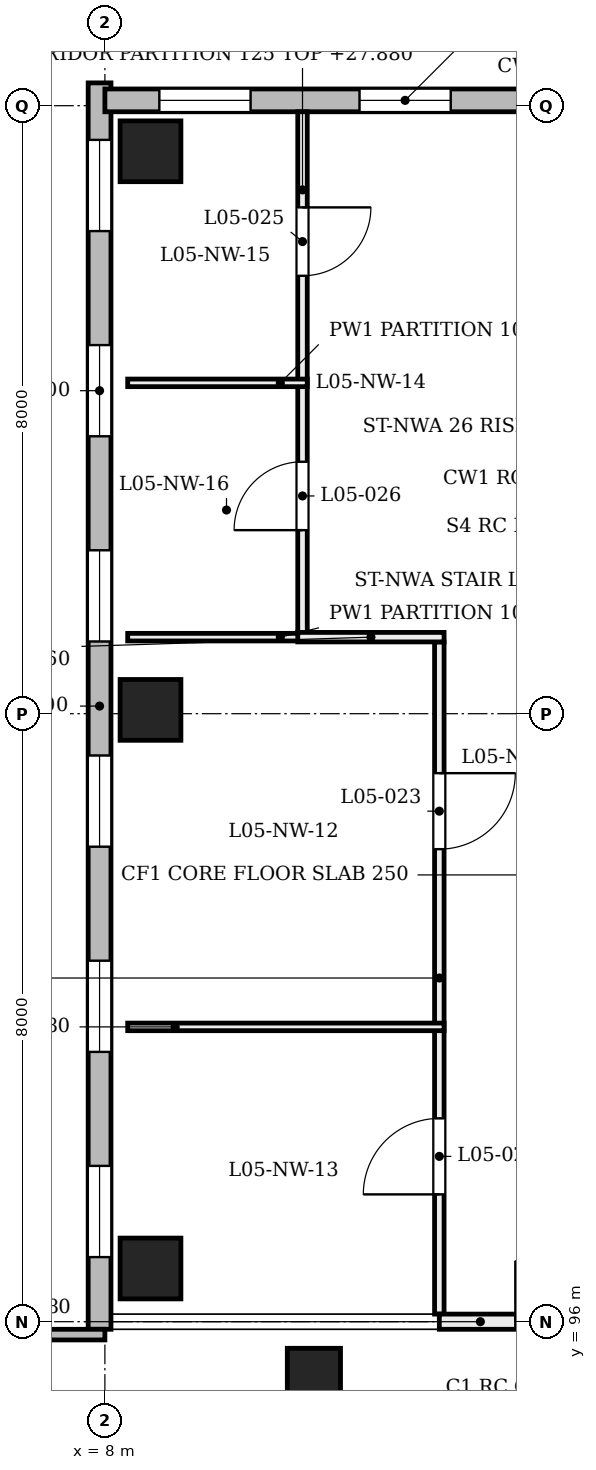
"""IFC4 building model, lengths in metres.
Left out: names, types, materials, properties, quantities, classifications, styles, units other than length and angle.
Written with IfcOpenShell. Run it as: python <this file> out.ifc"""

import sys

from ifc_helpers import new_model, si_unit, direction, frame, frame_2d, origin, origin_2d, place, context, subcontext, project, spatial, rectangle, extrude, element, fill, save


model = new_model("IFC4")
c1 = context("Model", 3, precision=1e-05, world=origin(), true_north=direction((0.0, 1.0)))
c2 = subcontext(c1, "Body", "Model", "MODEL_VIEW")
j1 = project(units=[si_unit("LENGTHUNIT", "METRE"), si_unit("PLANEANGLEUNIT", "RADIAN")], contexts=[c1])
p1 = place(None, origin())
s1 = spatial("IfcSite", under=j1, at=p1, CompositionType="ELEMENT")
p2 = place(p1, origin())
s2 = spatial("IfcBuilding", under=s1, at=p2, CompositionType="ELEMENT")
p3 = place(p2, frame((0.0, 0.0, 24.0)))
s3 = spatial("IfcBuildingStorey", under=s2, at=p3, CompositionType="ELEMENT", Elevation=24.0)
for number, where, z_axis, x_axis in (
    (1, (8.6, 96.7, 0.0), (0.0, 0.0, 1.0), (1.0, 0.0, 0.0)),
    (2, (8.6, 104.05, 0.0), (0.0, 0.0, 1.0), (1.0, 0.0, 0.0)),
    (3, (8.6, 111.4, 0.0), (0.0, 0.0, 1.0), (1.0, 0.0, 0.0)),
):
    element("IfcColumn", number, at=place(p3, frame(where, z_axis=z_axis, x_axis=x_axis)), inside=s3, PredefinedType="COLUMN", context=c2, shape_type="SweptSolid", body=[
        extrude(rectangle(XDim=0.8, YDim=0.8, at=origin_2d()), origin(), (0.0, 0.0, 1.0), 4.58),
    ])
p4 = place(p3, frame((11.0, 95.3, 0.0), z_axis=(-0.203937582782, 0.0, 0.978983892783), x_axis=(0.0, -1.0, 0.0)))
e4 = element("IfcColumn", 4, at=p4, inside=s3, PredefinedType="COLUMN", context=c2, shape_type="SweptSolid", body=[
    extrude(rectangle(XDim=0.7, YDim=0.7, at=origin_2d()), origin(), (0.0, 0.0, 1.0), 4.678),
])
p5 = place(p3, frame((7.93, 95.9, 0.0), z_axis=(0.0, 0.0, 1.0), x_axis=(0.0, 1.0, 0.0)))
e5 = element("IfcWall", 5, at=p5, inside=s3, PredefinedType="SOLIDWALL", context=c2, shape_type="SweptSolid", body=[
    extrude(rectangle(XDim=16.4, YDim=0.3, at=frame_2d((8.2, 0.0))), origin(), (0.0, 0.0, 1.0), 3.9),
])
p6 = place(p5, frame((0.95, 0.0, 1.0)))
e6 = element("IfcOpeningElement", 6, at=p6, cuts=e5, PredefinedType="OPENING", context=c2, shape_type="SweptSolid", body=[
    extrude(rectangle(XDim=1.2, YDim=2.4, at=frame_2d((0.6, 1.2))), frame((0.0, 0.16, 0.0), z_axis=(0.0, -1.0, 0.0), x_axis=(1.0, 0.0, 0.0)), (0.0, 0.0, 1.0), 0.32),
])
p7 = place(p5, frame((3.65, 0.0, 1.0)))
e7 = element("IfcOpeningElement", 7, at=p7, cuts=e5, PredefinedType="OPENING", context=c2, shape_type="SweptSolid", body=[
    extrude(rectangle(XDim=1.2, YDim=2.4, at=frame_2d((0.6, 1.2))), frame((0.0, 0.16, 0.0), z_axis=(0.0, -1.0, 0.0), x_axis=(1.0, 0.0, 0.0)), (0.0, 0.0, 1.0), 0.32),
])
p8 = place(p5, frame((6.35, 0.0, 1.0)))
e8 = element("IfcOpeningElement", 8, at=p8, cuts=e5, PredefinedType="OPENING", context=c2, shape_type="SweptSolid", body=[
    extrude(rectangle(XDim=1.2, YDim=2.4, at=frame_2d((0.6, 1.2))), frame((0.0, 0.16, 0.0), z_axis=(0.0, -1.0, 0.0), x_axis=(1.0, 0.0, 0.0)), (0.0, 0.0, 1.0), 0.32),
])
p9 = place(p5, frame((9.05, 0.0, 1.0)))
e9 = element("IfcOpeningElement", 9, at=p9, cuts=e5, PredefinedType="OPENING", context=c2, shape_type="SweptSolid", body=[
    extrude(rectangle(XDim=1.2, YDim=2.4, at=frame_2d((0.6, 1.2))), frame((0.0, 0.16, 0.0), z_axis=(0.0, -1.0, 0.0), x_axis=(1.0, 0.0, 0.0)), (0.0, 0.0, 1.0), 0.32),
])
p10 = place(p5, frame((11.75, 0.0, 1.0)))
e10 = element("IfcOpeningElement", 10, at=p10, cuts=e5, PredefinedType="OPENING", context=c2, shape_type="SweptSolid", body=[
    extrude(rectangle(XDim=1.2, YDim=2.4, at=frame_2d((0.6, 1.2))), frame((0.0, 0.16, 0.0), z_axis=(0.0, -1.0, 0.0), x_axis=(1.0, 0.0, 0.0)), (0.0, 0.0, 1.0), 0.32),
])
p11 = place(p5, frame((14.45, 0.0, 1.0)))
e11 = element("IfcOpeningElement", 11, at=p11, cuts=e5, PredefinedType="OPENING", context=c2, shape_type="SweptSolid", body=[
    extrude(rectangle(XDim=1.2, YDim=2.4, at=frame_2d((0.6, 1.2))), frame((0.0, 0.16, 0.0), z_axis=(0.0, -1.0, 0.0), x_axis=(1.0, 0.0, 0.0)), (0.0, 0.0, 1.0), 0.32),
])
p12 = place(p3, frame((8.0, 112.07, 0.0), z_axis=(0.0, 0.0, 1.0), x_axis=(1.0, 0.0, 0.0)))
e12 = element("IfcWall", 12, at=p12, inside=s3, PredefinedType="SOLIDWALL", context=c2, shape_type="SweptSolid", body=[
    extrude(rectangle(XDim=7.9, YDim=0.3, at=frame_2d((3.95, 0.0))), origin(), (0.0, 0.0, 1.0), 3.9),
])
p13 = place(p12, frame((0.717, 0.0, 1.0)))
e13 = element("IfcOpeningElement", 13, at=p13, cuts=e12, PredefinedType="OPENING", context=c2, shape_type="SweptSolid", body=[
    extrude(rectangle(XDim=1.2, YDim=2.4, at=frame_2d((0.6, 1.2))), frame((0.0, 0.16, 0.0), z_axis=(0.0, -1.0, 0.0), x_axis=(1.0, 0.0, 0.0)), (0.0, 0.0, 1.0), 0.32),
])
p14 = place(p12, frame((3.35, 0.0, 1.0)))
e14 = element("IfcOpeningElement", 14, at=p14, cuts=e12, PredefinedType="OPENING", context=c2, shape_type="SweptSolid", body=[
    extrude(rectangle(XDim=1.2, YDim=2.4, at=frame_2d((0.6, 1.2))), frame((0.0, 0.16, 0.0), z_axis=(0.0, -1.0, 0.0), x_axis=(1.0, 0.0, 0.0)), (0.0, 0.0, 1.0), 0.32),
])
p15 = place(p12, frame((5.983, 0.0, 1.0)))
e15 = element("IfcOpeningElement", 15, at=p15, cuts=e12, PredefinedType="OPENING", context=c2, shape_type="SweptSolid", body=[
    extrude(rectangle(XDim=1.2, YDim=2.4, at=frame_2d((0.6, 1.2))), frame((0.0, 0.16, 0.0), z_axis=(0.0, -1.0, 0.0), x_axis=(1.0, 0.0, 0.0)), (0.0, 0.0, 1.0), 0.32),
])
p16 = place(p3, frame((3.0, 95.83, 0.0), z_axis=(0.0, 0.0, 1.0), x_axis=(1.0, 0.0, 0.0)))
e16 = element("IfcWall", 16, at=p16, inside=s3, PredefinedType="SOLIDWALL", context=c2, shape_type="SweptSolid", body=[
    extrude(rectangle(XDim=5.0, YDim=0.14, at=frame_2d((2.5, 0.0))), origin(), (0.0, 0.0, 1.0), 3.9),
])
p17 = place(p3, frame((12.4, 96.1, 0.0), z_axis=(0.0, 0.0, 1.0), x_axis=(0.0, 1.0, 0.0)))
e17 = element("IfcWall", 17, at=p17, inside=s3, PredefinedType="PARTITIONING", context=c2, shape_type="SweptSolid", body=[
    extrude(rectangle(XDim=8.844, YDim=0.125, at=frame_2d((4.422, 0.0))), origin(), (0.0, 0.0, 1.0), 3.88),
])
p18 = place(p17, frame((6.117, 0.0, 0.0)))
e18 = element("IfcOpeningElement", 18, at=p18, cuts=e17, PredefinedType="OPENING", context=c2, shape_type="SweptSolid", body=[
    extrude(rectangle(XDim=1.0, YDim=2.1, at=frame_2d((0.5, 1.05))), frame((0.0, 0.073, 0.0), z_axis=(0.0, -1.0, 0.0), x_axis=(1.0, 0.0, 0.0)), (0.0, 0.0, 1.0), 0.145),
])
p19 = place(p17, frame((1.575, 0.0, 0.0)))
e19 = element("IfcOpeningElement", 19, at=p19, cuts=e17, PredefinedType="OPENING", context=c2, shape_type="SweptSolid", body=[
    extrude(rectangle(XDim=1.0, YDim=2.1, at=frame_2d((0.5, 1.05))), frame((0.0, 0.073, 0.0), z_axis=(0.0, -1.0, 0.0), x_axis=(1.0, 0.0, 0.0)), (0.0, 0.0, 1.0), 0.145),
])
p20 = place(p3, frame((10.6, 105.069, 0.0), z_axis=(0.0, 0.0, 1.0), x_axis=(0.0, 1.0, 0.0)))
e20 = element("IfcWall", 20, at=p20, inside=s3, PredefinedType="PARTITIONING", context=c2, shape_type="SweptSolid", body=[
    extrude(rectangle(XDim=6.851, YDim=0.125, at=frame_2d((3.425, 0.0))), origin(), (0.0, 0.0, 1.0), 3.88),
])
p21 = place(p20, frame((4.693, 0.0, 0.0)))
e21 = element("IfcOpeningElement", 21, at=p21, cuts=e20, PredefinedType="OPENING", context=c2, shape_type="SweptSolid", body=[
    extrude(rectangle(XDim=0.9, YDim=2.1, at=frame_2d((0.45, 1.05))), frame((0.0, 0.073, 0.0), z_axis=(0.0, -1.0, 0.0), x_axis=(1.0, 0.0, 0.0)), (0.0, 0.0, 1.0), 0.145),
])
p22 = place(p20, frame((1.346, 0.0, 0.0)))
e22 = element("IfcOpeningElement", 22, at=p22, cuts=e20, PredefinedType="OPENING", context=c2, shape_type="SweptSolid", body=[
    extrude(rectangle(XDim=0.9, YDim=2.1, at=frame_2d((0.45, 1.05))), frame((0.0, 0.073, 0.0), z_axis=(0.0, -1.0, 0.0), x_axis=(1.0, 0.0, 0.0)), (0.0, 0.0, 1.0), 0.145),
])
p23 = place(p3, frame((8.3, 99.879, 0.0), z_axis=(0.0, 0.0, 1.0), x_axis=(1.0, 0.0, 0.0)))
e23 = element("IfcWall", 23, at=p23, inside=s3, PredefinedType="PARTITIONING", context=c2, shape_type="SweptSolid", body=[
    extrude(rectangle(XDim=4.162, YDim=0.1, at=frame_2d((2.081, 0.0))), origin(), (0.0, 0.0, 1.0), 3.98),
])
p24 = place(p3, frame((8.3, 105.007, 0.0), z_axis=(0.0, 0.0, 1.0), x_axis=(1.0, 0.0, 0.0)))
e24 = element("IfcWall", 24, at=p24, inside=s3, PredefinedType="PARTITIONING", context=c2, shape_type="SweptSolid", body=[
    extrude(rectangle(XDim=2.363, YDim=0.1, at=frame_2d((1.181, 0.0))), origin(), (0.0, 0.0, 1.0), 3.98),
])
p25 = place(p3, frame((10.538, 105.007, 0.0), z_axis=(0.0, 0.0, 1.0), x_axis=(1.0, 0.0, 0.0)))
e25 = element("IfcWall", 25, at=p25, inside=s3, PredefinedType="PARTITIONING", context=c2, shape_type="SweptSolid", body=[
    extrude(rectangle(XDim=1.925, YDim=0.125, at=frame_2d((0.962, 0.0))), origin(), (0.0, 0.0, 1.0), 4.56),
])
p26 = place(p3, frame((8.3, 108.353, 0.0), z_axis=(0.0, 0.0, 1.0), x_axis=(1.0, 0.0, 0.0)))
e26 = element("IfcWall", 26, at=p26, inside=s3, PredefinedType="PARTITIONING", context=c2, shape_type="SweptSolid", body=[
    extrude(rectangle(XDim=2.363, YDim=0.1, at=frame_2d((1.181, 0.0))), origin(), (0.0, 0.0, 1.0), 3.98),
])
p27 = place(p3, frame((12.4, 96.0, 0.0), z_axis=(0.0, 0.0, 1.0), x_axis=(1.0, 0.0, 0.0)))
e27 = element("IfcWall", 27, at=p27, inside=s3, PredefinedType="PARTITIONING", context=c2, shape_type="SweptSolid", body=[
    extrude(rectangle(XDim=3.6, YDim=0.2, at=frame_2d((1.8, 0.0))), origin(), (0.0, 0.0, 1.0), 3.88),
])
p28 = place(p27, frame((1.0, 0.0, 0.0)))
e28 = element("IfcOpeningElement", 28, at=p28, cuts=e27, PredefinedType="OPENING", context=c2, shape_type="SweptSolid", body=[
    extrude(rectangle(XDim=1.6, YDim=2.1, at=frame_2d((0.8, 1.05))), frame((0.0, 0.11, 0.0), z_axis=(0.0, -1.0, 0.0), x_axis=(1.0, 0.0, 0.0)), (0.0, 0.0, 1.0), 0.22),
])
p29 = place(p6, origin())
e29 = element("IfcWindow", 29, at=p29, inside=s3, PartitioningType="SINGLE_PANEL", PredefinedType="WINDOW", context=c2, shape_type="SweptSolid", body=[
    extrude(rectangle(XDim=1.2, YDim=2.4, at=frame_2d((0.6, 1.2))), frame((0.0, 0.03, 0.0), z_axis=(0.0, -1.0, 0.0), x_axis=(1.0, 0.0, 0.0)), (0.0, 0.0, 1.0), 0.06),
])
fill(e6, e29)
p30 = place(p7, origin())
e30 = element("IfcWindow", 30, at=p30, inside=s3, PartitioningType="SINGLE_PANEL", PredefinedType="WINDOW", context=c2, shape_type="SweptSolid", body=[
    extrude(rectangle(XDim=1.2, YDim=2.4, at=frame_2d((0.6, 1.2))), frame((0.0, 0.03, 0.0), z_axis=(0.0, -1.0, 0.0), x_axis=(1.0, 0.0, 0.0)), (0.0, 0.0, 1.0), 0.06),
])
fill(e7, e30)
p31 = place(p8, origin())
e31 = element("IfcWindow", 31, at=p31, inside=s3, PartitioningType="SINGLE_PANEL", PredefinedType="WINDOW", context=c2, shape_type="SweptSolid", body=[
    extrude(rectangle(XDim=1.2, YDim=2.4, at=frame_2d((0.6, 1.2))), frame((0.0, 0.03, 0.0), z_axis=(0.0, -1.0, 0.0), x_axis=(1.0, 0.0, 0.0)), (0.0, 0.0, 1.0), 0.06),
])
fill(e8, e31)
p32 = place(p9, origin())
e32 = element("IfcWindow", 32, at=p32, inside=s3, PartitioningType="SINGLE_PANEL", PredefinedType="WINDOW", context=c2, shape_type="SweptSolid", body=[
    extrude(rectangle(XDim=1.2, YDim=2.4, at=frame_2d((0.6, 1.2))), frame((0.0, 0.03, 0.0), z_axis=(0.0, -1.0, 0.0), x_axis=(1.0, 0.0, 0.0)), (0.0, 0.0, 1.0), 0.06),
])
fill(e9, e32)
p33 = place(p10, origin())
e33 = element("IfcWindow", 33, at=p33, inside=s3, PartitioningType="SINGLE_PANEL", PredefinedType="WINDOW", context=c2, shape_type="SweptSolid", body=[
    extrude(rectangle(XDim=1.2, YDim=2.4, at=frame_2d((0.6, 1.2))), frame((0.0, 0.03, 0.0), z_axis=(0.0, -1.0, 0.0), x_axis=(1.0, 0.0, 0.0)), (0.0, 0.0, 1.0), 0.06),
])
fill(e10, e33)
p34 = place(p11, origin())
e34 = element("IfcWindow", 34, at=p34, inside=s3, PartitioningType="SINGLE_PANEL", PredefinedType="WINDOW", context=c2, shape_type="SweptSolid", body=[
    extrude(rectangle(XDim=1.2, YDim=2.4, at=frame_2d((0.6, 1.2))), frame((0.0, 0.03, 0.0), z_axis=(0.0, -1.0, 0.0), x_axis=(1.0, 0.0, 0.0)), (0.0, 0.0, 1.0), 0.06),
])
fill(e11, e34)
p35 = place(p13, origin())
e35 = element("IfcWindow", 35, at=p35, inside=s3, PartitioningType="SINGLE_PANEL", PredefinedType="WINDOW", context=c2, shape_type="SweptSolid", body=[
    extrude(rectangle(XDim=1.2, YDim=2.4, at=frame_2d((0.6, 1.2))), frame((0.0, 0.03, 0.0), z_axis=(0.0, -1.0, 0.0), x_axis=(1.0, 0.0, 0.0)), (0.0, 0.0, 1.0), 0.06),
])
fill(e13, e35)
p36 = place(p14, origin())
e36 = element("IfcWindow", 36, at=p36, inside=s3, PartitioningType="SINGLE_PANEL", PredefinedType="WINDOW", context=c2, shape_type="SweptSolid", body=[
    extrude(rectangle(XDim=1.2, YDim=2.4, at=frame_2d((0.6, 1.2))), frame((0.0, 0.03, 0.0), z_axis=(0.0, -1.0, 0.0), x_axis=(1.0, 0.0, 0.0)), (0.0, 0.0, 1.0), 0.06),
])
fill(e14, e36)
p37 = place(p18, origin())
e37 = element("IfcDoor", 37, at=p37, inside=s3, OperationType="SINGLE_SWING_RIGHT", PredefinedType="DOOR", context=c2, shape_type="SweptSolid", body=[
    extrude(rectangle(XDim=1.0, YDim=2.1, at=frame_2d((0.5, 1.05))), frame((0.0, 0.025, 0.0), z_axis=(0.0, -1.0, 0.0), x_axis=(1.0, 0.0, 0.0)), (0.0, 0.0, 1.0), 0.05),
])
fill(e18, e37)
p38 = place(p19, origin())
e38 = element("IfcDoor", 38, at=p38, inside=s3, OperationType="SINGLE_SWING_LEFT", PredefinedType="DOOR", context=c2, shape_type="SweptSolid", body=[
    extrude(rectangle(XDim=1.0, YDim=2.1, at=frame_2d((0.5, 1.05))), frame((0.0, 0.025, 0.0), z_axis=(0.0, -1.0, 0.0), x_axis=(1.0, 0.0, 0.0)), (0.0, 0.0, 1.0), 0.05),
])
fill(e19, e38)
p39 = place(p21, origin())
e39 = element("IfcDoor", 39, at=p39, inside=s3, OperationType="SINGLE_SWING_RIGHT", PredefinedType="DOOR", context=c2, shape_type="SweptSolid", body=[
    extrude(rectangle(XDim=0.9, YDim=2.1, at=frame_2d((0.45, 1.05))), frame((0.0, 0.025, 0.0), z_axis=(0.0, -1.0, 0.0), x_axis=(1.0, 0.0, 0.0)), (0.0, 0.0, 1.0), 0.05),
])
fill(e21, e39)
p40 = place(p22, origin())
e40 = element("IfcDoor", 40, at=p40, inside=s3, OperationType="SINGLE_SWING_LEFT", PredefinedType="DOOR", context=c2, shape_type="SweptSolid", body=[
    extrude(rectangle(XDim=0.9, YDim=2.1, at=frame_2d((0.45, 1.05))), frame((0.0, 0.025, 0.0), z_axis=(0.0, -1.0, 0.0), x_axis=(1.0, 0.0, 0.0)), (0.0, 0.0, 1.0), 0.05),
])
fill(e22, e40)
save(model, sys.argv[1])
